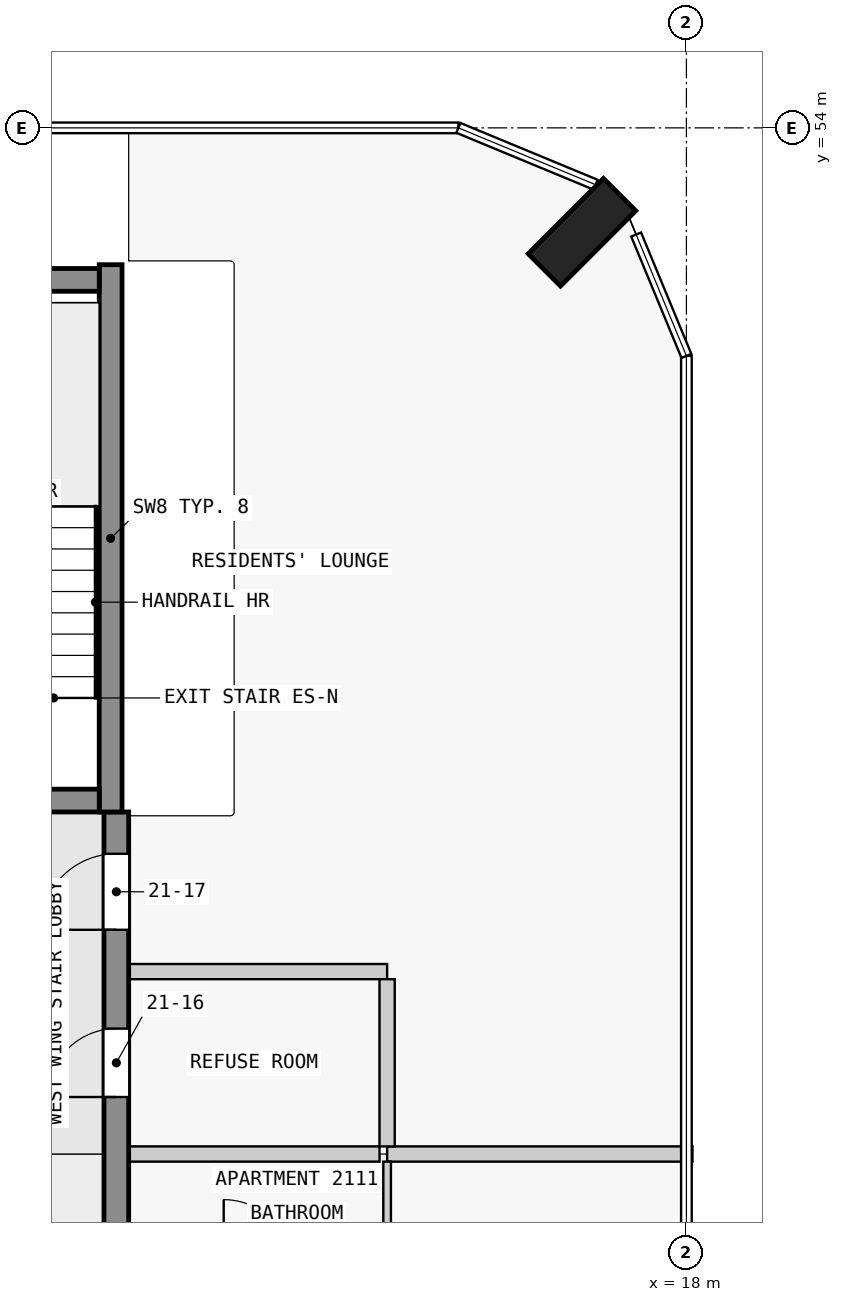
"""IFC4 building model, lengths in metres.
Left out: names, types, materials, properties, quantities, classifications, styles, units other than length and angle.
Written with IfcOpenShell. Run it as: python <this file> out.ifc"""

import sys

from ifc_helpers import new_model, si_unit, direction, frame, frame_2d, origin, origin_2d, place, context, subcontext, project, spatial, rectangle, extrude, element, fill, save


model = new_model("IFC4")
c1 = context("Model", 3, precision=1e-05, world=origin(), true_north=direction((0.0, 1.0)))
c2 = subcontext(c1, "Body", "Model", "MODEL_VIEW")
j1 = project(units=[si_unit("LENGTHUNIT", "METRE"), si_unit("PLANEANGLEUNIT", "RADIAN")], contexts=[c1])
p1 = place(None, origin())
s1 = spatial("IfcSite", under=j1, at=p1, CompositionType="ELEMENT")
p2 = place(p1, origin())
s2 = spatial("IfcBuilding", under=s1, at=p2, CompositionType="ELEMENT")
p3 = place(p2, frame((0.0, 0.0, 85.3)))
s3 = spatial("IfcBuildingStorey", under=s2, at=p3, CompositionType="ELEMENT", Elevation=85.3)
p4 = place(p3, frame((16.626, 52.626, 0.0), z_axis=(0.0, 0.0, 1.0), x_axis=(-0.707106781187, 0.707106781187, 0.0)))
e1 = element("IfcColumn", 1, at=p4, inside=s3, PredefinedType="COLUMN", context=c2, shape_type="SweptSolid", body=[
    extrude(rectangle(XDim=0.6, YDim=1.4, at=origin_2d()), origin(), (0.0, 0.0, 1.0), 3.5),
])
p5 = place(p3, frame((7.725, 45.15, 0.0), z_axis=(0.0, 0.0, 1.0), x_axis=(1.0, 0.0, 0.0)))
e2 = element("IfcWall", 2, at=p5, inside=s3, PredefinedType="SHEAR", context=c2, shape_type="SweptSolid", body=[
    extrude(rectangle(XDim=2.55, YDim=0.3, at=frame_2d((1.275, 0.0))), origin(), (0.0, 0.0, 1.0), 3.5),
])
p6 = place(p5, frame((0.725, 0.0, 0.0)))
e3 = element("IfcOpeningElement", 3, at=p6, cuts=e2, PredefinedType="OPENING", context=c2, shape_type="SweptSolid", body=[
    extrude(rectangle(XDim=1.1, YDim=2.1, at=frame_2d((0.55, 1.05))), frame((0.0, 0.16, 0.0), z_axis=(0.0, -1.0, 0.0), x_axis=(1.0, 0.0, 0.0)), (0.0, 0.0, 1.0), 0.32),
])
p7 = place(p3, frame((7.725, 52.0, 0.0), z_axis=(0.0, 0.0, 1.0), x_axis=(1.0, 0.0, 0.0)))
e4 = element("IfcWall", 4, at=p7, inside=s3, PredefinedType="SHEAR", context=c2, shape_type="SweptSolid", body=[
    extrude(rectangle(XDim=2.55, YDim=0.3, at=frame_2d((1.275, 0.0))), origin(), (0.0, 0.0, 1.0), 3.5),
])
p8 = place(p3, frame((10.425, 45.0, 0.0), z_axis=(0.0, 0.0, 1.0), x_axis=(0.0, 1.0, 0.0)))
e5 = element("IfcWall", 5, at=p8, inside=s3, PredefinedType="SHEAR", context=c2, shape_type="SweptSolid", body=[
    extrude(rectangle(XDim=7.2, YDim=0.3, at=frame_2d((3.6, 0.0))), origin(), (0.0, 0.0, 1.0), 3.5),
])
p9 = place(p3, frame((10.5, 18.0, 0.0), z_axis=(0.0, 0.0, 1.0), x_axis=(0.0, 1.0, 0.0)))
e6 = element("IfcWall", 6, at=p9, inside=s3, PredefinedType="SHEAR", context=c2, shape_type="SweptSolid", body=[
    extrude(rectangle(XDim=27.0, YDim=0.325, at=frame_2d((13.5, 0.0))), origin(), (0.0, 0.0, 1.0), 3.25),
])
p10 = place(p9, frame((4.05, 0.0, 0.0)))
e7 = element("IfcOpeningElement", 7, at=p10, cuts=e6, PredefinedType="OPENING", context=c2, shape_type="SweptSolid", body=[
    extrude(rectangle(XDim=1.0, YDim=2.1, at=frame_2d((0.5, 1.05))), frame((0.0, 0.172, 0.0), z_axis=(0.0, -1.0, 0.0), x_axis=(1.0, 0.0, 0.0)), (0.0, 0.0, 1.0), 0.345),
])
p11 = place(p9, frame((13.05, 0.0, 0.0)))
e8 = element("IfcOpeningElement", 8, at=p11, cuts=e6, PredefinedType="OPENING", context=c2, shape_type="SweptSolid", body=[
    extrude(rectangle(XDim=1.0, YDim=2.1, at=frame_2d((0.5, 1.05))), frame((0.0, 0.172, 0.0), z_axis=(0.0, -1.0, 0.0), x_axis=(1.0, 0.0, 0.0)), (0.0, 0.0, 1.0), 0.345),
])
p12 = place(p9, frame((19.75, 0.0, 0.0)))
e9 = element("IfcOpeningElement", 9, at=p12, cuts=e6, PredefinedType="OPENING", context=c2, shape_type="SweptSolid", body=[
    extrude(rectangle(XDim=1.0, YDim=2.1, at=frame_2d((0.5, 1.05))), frame((0.0, 0.172, 0.0), z_axis=(0.0, -1.0, 0.0), x_axis=(1.0, 0.0, 0.0)), (0.0, 0.0, 1.0), 0.345),
])
p13 = place(p9, frame((23.25, 0.0, 0.0)))
e10 = element("IfcOpeningElement", 10, at=p13, cuts=e6, PredefinedType="OPENING", context=c2, shape_type="SweptSolid", body=[
    extrude(rectangle(XDim=0.9, YDim=2.1, at=frame_2d((0.45, 1.05))), frame((0.0, 0.172, 0.0), z_axis=(0.0, -1.0, 0.0), x_axis=(1.0, 0.0, 0.0)), (0.0, 0.0, 1.0), 0.345),
])
p14 = place(p9, frame((25.45, 0.0, 0.0)))
e11 = element("IfcOpeningElement", 11, at=p14, cuts=e6, PredefinedType="OPENING", context=c2, shape_type="SweptSolid", body=[
    extrude(rectangle(XDim=1.0, YDim=2.1, at=frame_2d((0.5, 1.05))), frame((0.0, 0.172, 0.0), z_axis=(0.0, -1.0, 0.0), x_axis=(1.0, 0.0, 0.0)), (0.0, 0.0, 1.0), 0.345),
])
p15 = place(p3, frame((13.962, 40.5, 0.0), z_axis=(0.0, 0.0, 1.0), x_axis=(-1.0, 0.0, 0.0)))
e12 = element("IfcWall", 12, at=p15, inside=s3, PredefinedType="PARTITIONING", context=c2, shape_type="SweptSolid", body=[
    extrude(rectangle(XDim=3.3, YDim=0.2, at=frame_2d((1.65, 0.0))), origin(), (0.0, 0.0, 1.0), 3.25),
])
p16 = place(p3, frame((14.062, 40.5, 0.0), z_axis=(0.0, 0.0, 1.0), x_axis=(1.0, 0.0, 0.0)))
e13 = element("IfcWall", 13, at=p16, inside=s3, PredefinedType="PARTITIONING", context=c2, shape_type="SweptSolid", body=[
    extrude(rectangle(XDim=4.018, YDim=0.2, at=frame_2d((2.009, 0.0))), origin(), (0.0, 0.0, 1.0), 3.25),
])
p17 = place(p3, frame((14.062, 42.9, 0.0), z_axis=(0.0, 0.0, 1.0), x_axis=(-1.0, 0.0, 0.0)))
e14 = element("IfcWall", 14, at=p17, inside=s3, PredefinedType="PARTITIONING", context=c2, shape_type="SweptSolid", body=[
    extrude(rectangle(XDim=3.4, YDim=0.2, at=frame_2d((1.7, 0.0))), origin(), (0.0, 0.0, 1.0), 3.25),
])
p18 = place(p3, frame((14.062, 39.05, 0.0), z_axis=(0.0, 0.0, 1.0), x_axis=(0.0, 1.0, 0.0)))
e15 = element("IfcWall", 15, at=p18, inside=s3, PredefinedType="PARTITIONING", context=c2, shape_type="SweptSolid", body=[
    extrude(rectangle(XDim=1.35, YDim=0.1, at=frame_2d((0.675, 0.0))), origin(), (0.0, 0.0, 1.0), 3.25),
])
p19 = place(p3, frame((14.062, 40.6, 0.0), z_axis=(0.0, 0.0, 1.0), x_axis=(0.0, 1.0, 0.0)))
e16 = element("IfcWall", 16, at=p19, inside=s3, PredefinedType="PARTITIONING", context=c2, shape_type="SweptSolid", body=[
    extrude(rectangle(XDim=2.2, YDim=0.2, at=frame_2d((1.1, 0.0))), origin(), (0.0, 0.0, 1.0), 3.25),
])
p20 = place(p13, origin())
e17 = element("IfcDoor", 17, at=p20, inside=s3, OperationType="SINGLE_SWING_RIGHT", PredefinedType="DOOR", context=c2, shape_type="SweptSolid", body=[
    extrude(rectangle(XDim=0.9, YDim=2.1, at=frame_2d((0.45, 1.05))), frame((0.0, 0.025, 0.0), z_axis=(0.0, -1.0, 0.0), x_axis=(1.0, 0.0, 0.0)), (0.0, 0.0, 1.0), 0.05),
])
fill(e10, e17)
p21 = place(p14, origin())
e18 = element("IfcDoor", 18, at=p21, inside=s3, OperationType="SINGLE_SWING_RIGHT", PredefinedType="DOOR", context=c2, shape_type="SweptSolid", body=[
    extrude(rectangle(XDim=1.0, YDim=2.1, at=frame_2d((0.5, 1.05))), frame((0.0, 0.025, 0.0), z_axis=(0.0, -1.0, 0.0), x_axis=(1.0, 0.0, 0.0)), (0.0, 0.0, 1.0), 0.05),
])
fill(e11, e18)
save(model, sys.argv[1])
